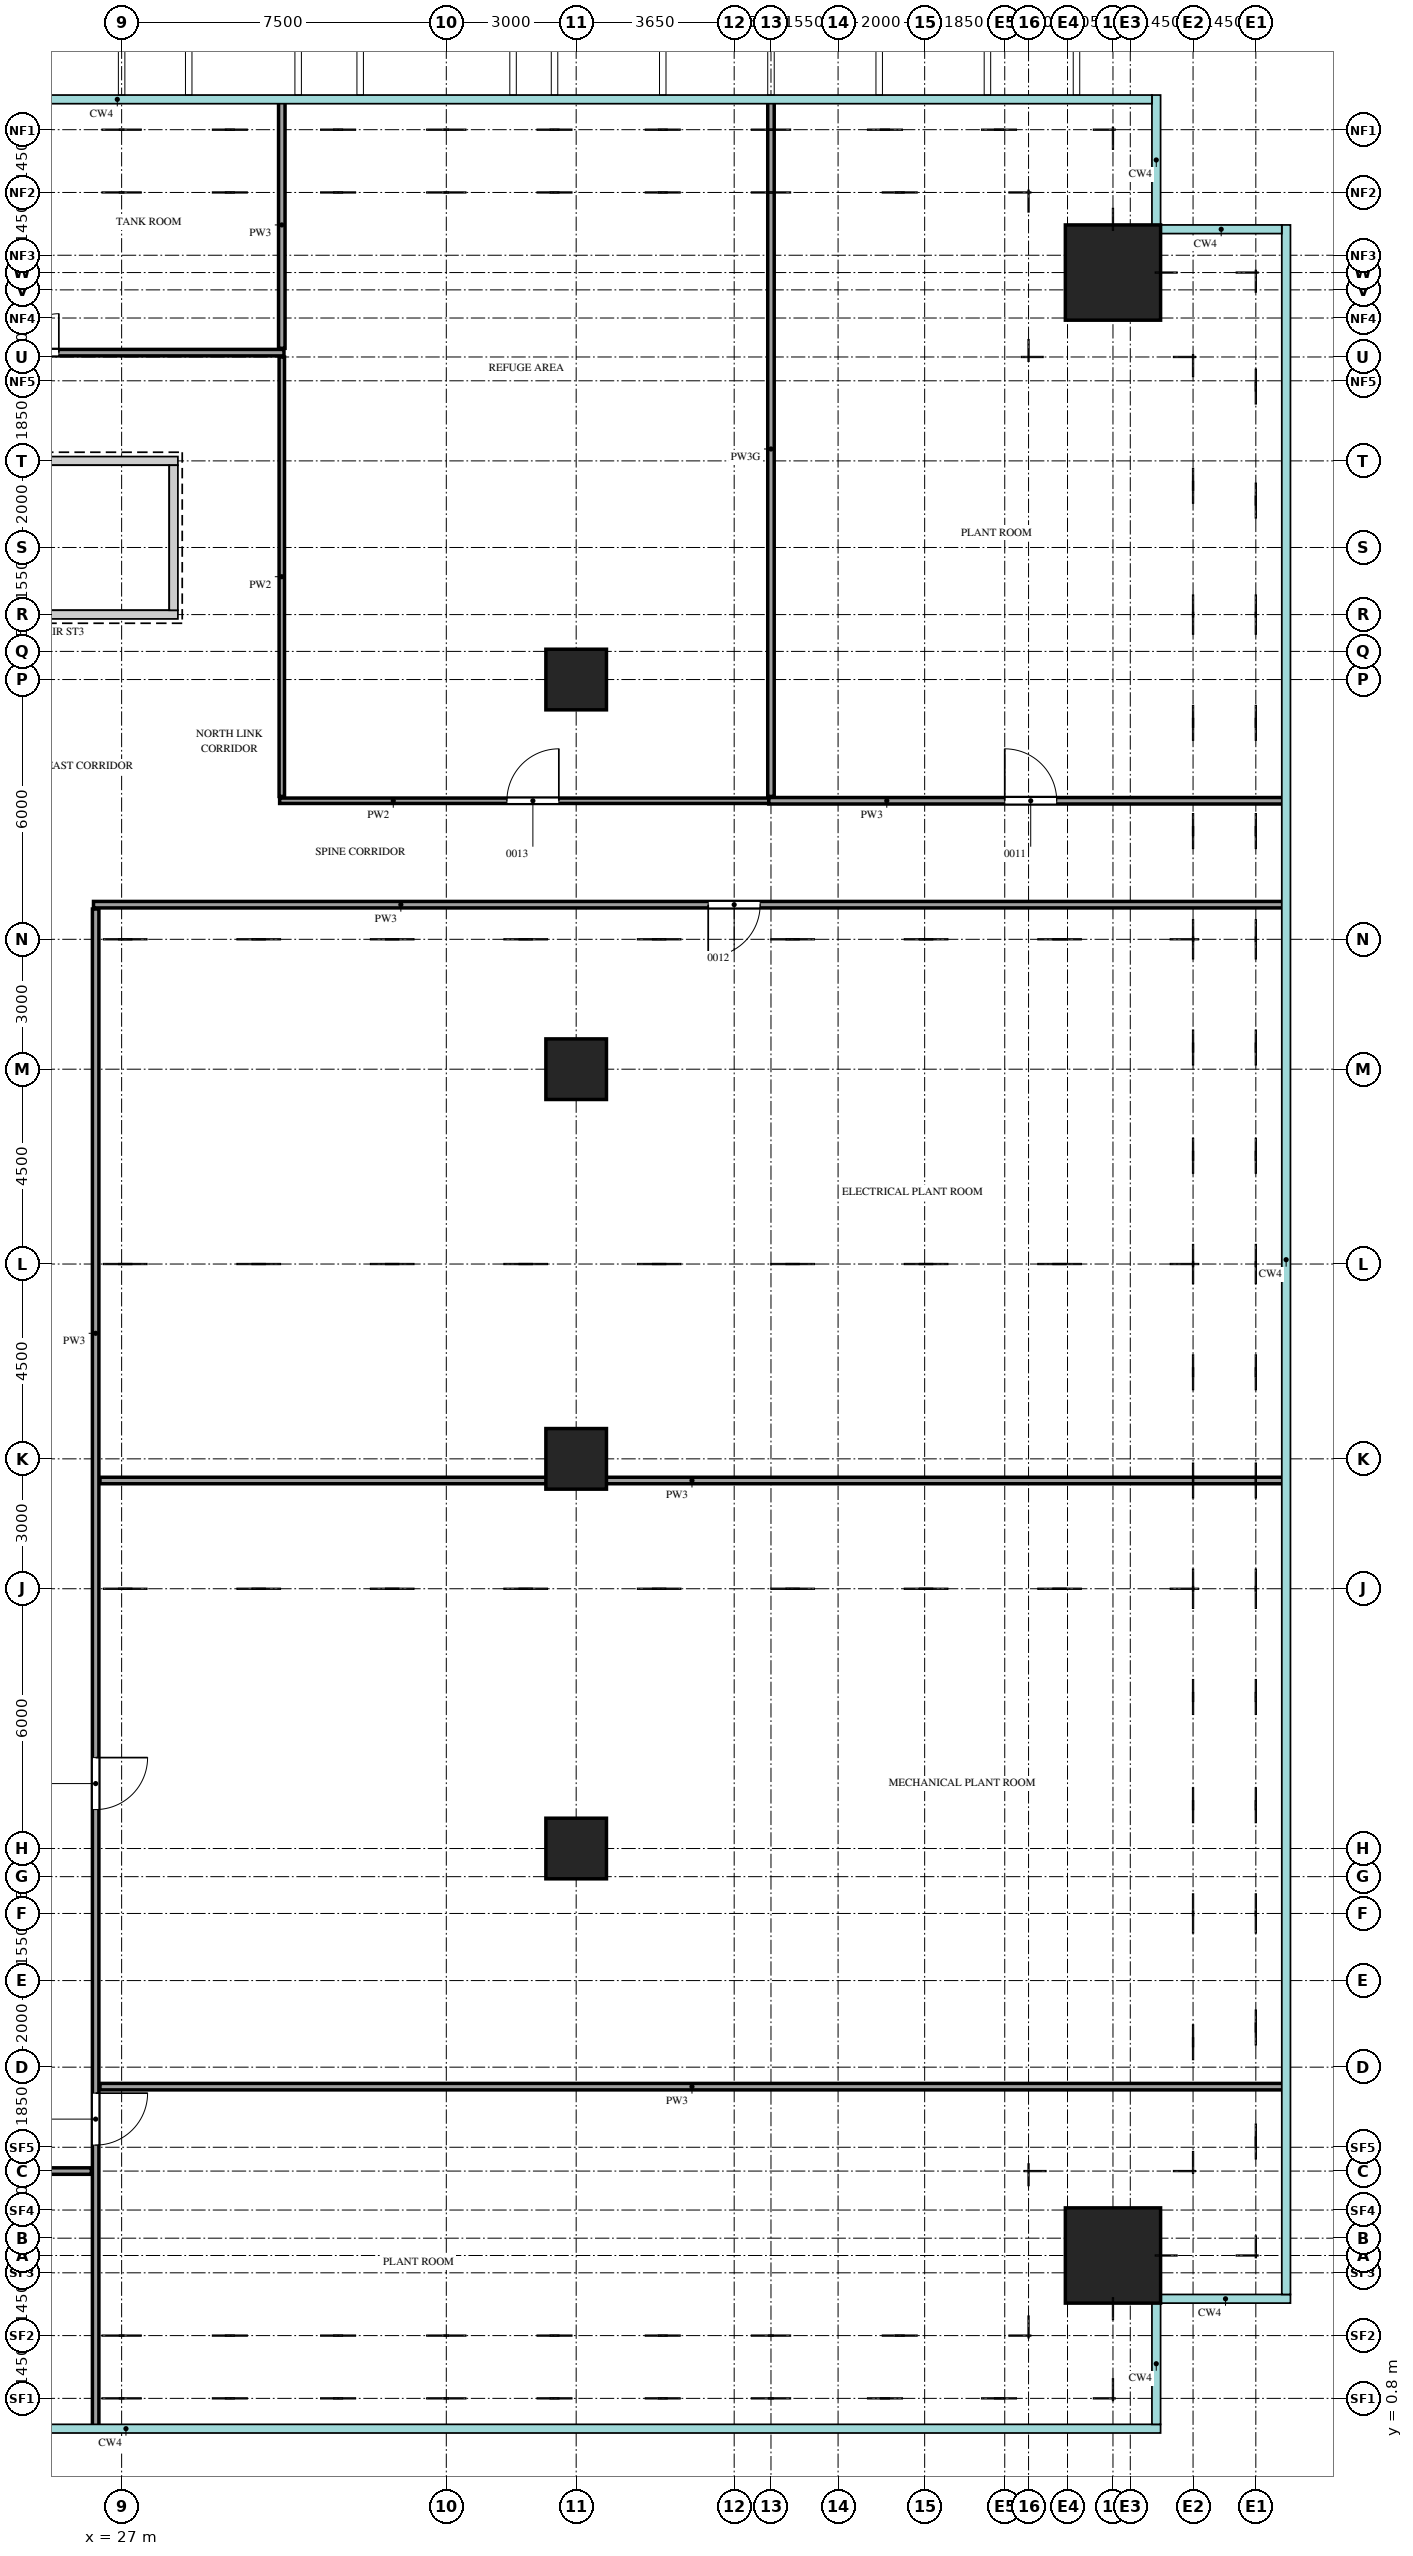
"""IFC4 building model, lengths in metres.
Left out: names, types, materials, properties, quantities, classifications, styles, units other than length and angle.
Written with IfcOpenShell. Run it as: python <this file> out.ifc"""

import sys

from ifc_helpers import new_model, si_unit, direction, frame, frame_2d, origin, origin_2d, place, context, subcontext, project, spatial, rectangle, extrude, source, transform, mapped, element, fill, save


model = new_model("IFC4")
c1 = context("Model", 3, precision=1e-05, world=origin(), true_north=direction((0.0, 1.0)))
c2 = subcontext(c1, "Body", "Model", "MODEL_VIEW")
j1 = project(units=[si_unit("LENGTHUNIT", "METRE"), si_unit("PLANEANGLEUNIT", "RADIAN")], contexts=[c1])
p1 = place(None, origin())
s1 = spatial("IfcSite", under=j1, at=p1, CompositionType="ELEMENT")
p2 = place(p1, origin())
s2 = spatial("IfcBuilding", under=s1, at=p2, CompositionType="ELEMENT")
p3 = place(p2, frame((0.0, 0.0, 96.0)))
s3 = spatial("IfcBuildingStorey", under=s2, at=p3, CompositionType="ELEMENT", Elevation=96.0)
m1 = source(origin(), c2, "Body", "SweptSolid", [
    extrude(rectangle(XDim=7.1, YDim=0.2, at=frame_2d((3.55, 0.0))), origin(), (0.0, 0.0, 1.0), 5.2),
])
p4 = place(p3, frame((21.2, 45.55, 0.0), z_axis=(0.0, 0.0, 1.0), x_axis=(1.0, 0.0, 0.0)))
e1 = element("IfcWall", 1, at=p4, inside=s3, PredefinedType="SHEAR", context=c2, shape_type="MappedRepresentation", body=[
    mapped(m1, transform((0.0, 0.0, 0.0))),
])
m2 = source(origin(), c2, "Body", "SweptSolid", [
    extrude(rectangle(XDim=1.2, YDim=2.1, at=frame_2d((0.6, 1.05))), frame((0.0, 0.11, 0.0), z_axis=(0.0, -1.0, 0.0), x_axis=(1.0, 0.0, 0.0)), (0.0, 0.0, 1.0), 0.22),
])
p5 = place(p4, frame((0.15, 0.0, 0.0)))
e2 = element("IfcOpeningElement", 2, at=p5, cuts=e1, PredefinedType="OPENING", context=c2, shape_type="MappedRepresentation", body=[
    mapped(m2, transform((0.0, 0.0, 0.0))),
])
p6 = place(p3, frame((21.2, 42.0, 0.0), z_axis=(0.0, 0.0, 1.0), x_axis=(1.0, 0.0, 0.0)))
e3 = element("IfcWall", 3, at=p6, inside=s3, PredefinedType="SHEAR", context=c2, shape_type="MappedRepresentation", body=[
    mapped(m1, transform((0.0, 0.0, 0.0))),
])
m3 = source(origin(), c2, "Body", "SweptSolid", [
    extrude(rectangle(XDim=3.35, YDim=0.2, at=frame_2d((1.675, 0.0))), origin(), (0.0, 0.0, 1.0), 5.2),
])
p7 = place(p3, frame((28.2, 42.1, 0.0), z_axis=(0.0, 0.0, 1.0), x_axis=(0.0, 1.0, 0.0)))
e4 = element("IfcWall", 4, at=p7, inside=s3, PredefinedType="SHEAR", context=c2, shape_type="MappedRepresentation", body=[
    mapped(m3, transform((0.0, 0.0, 0.0))),
])
m4 = source(origin(), c2, "Body", "SweptSolid", [
    extrude(rectangle(XDim=2.2, YDim=2.2, at=origin_2d()), origin(), (0.0, 0.0, 1.0), 5.5),
])
for number, where, z_axis, x_axis in (
    (5, (49.9, 49.9, 0.0), (0.0, 0.0, 1.0), (1.0, 0.0, 0.0)),
    (6, (49.9, 4.1, 0.0), (0.0, 0.0, 1.0), (1.0, 0.0, 0.0)),
):
    element("IfcColumn", number, at=place(p3, frame(where, z_axis=z_axis, x_axis=x_axis)), inside=s3, PredefinedType="COLUMN", context=c2, shape_type="MappedRepresentation", body=[
        mapped(m4, transform((0.0, 0.0, 0.0))),
    ])
m5 = source(origin(), c2, "Body", "SweptSolid", [
    extrude(rectangle(XDim=1.4, YDim=1.4, at=origin_2d()), origin(), (0.0, 0.0, 1.0), 5.2),
])
for number, where, z_axis, x_axis in (
    (7, (37.5, 13.5, 0.0), (0.0, 0.0, 1.0), (1.0, 0.0, 0.0)),
    (8, (37.5, 22.5, 0.0), (0.0, 0.0, 1.0), (1.0, 0.0, 0.0)),
    (9, (37.5, 31.5, 0.0), (0.0, 0.0, 1.0), (1.0, 0.0, 0.0)),
    (10, (37.5, 40.5, 0.0), (0.0, 0.0, 1.0), (1.0, 0.0, 0.0)),
):
    element("IfcColumn", number, at=place(p3, frame(where, z_axis=z_axis, x_axis=x_axis)), inside=s3, PredefinedType="COLUMN", context=c2, shape_type="MappedRepresentation", body=[
        mapped(m5, transform((0.0, 0.0, 0.0))),
    ])
m6 = source(origin(), c2, "Body", "SweptSolid", [
    extrude(rectangle(XDim=35.05, YDim=0.15, at=frame_2d((17.525, 0.0))), origin(), (0.0, 0.0, 1.0), 5.2),
])
p8 = place(p3, frame((26.4, 0.15, 0.0), z_axis=(0.0, 0.0, 1.0), x_axis=(0.0, 1.0, 0.0)))
e11 = element("IfcWall", 11, at=p8, inside=s3, PredefinedType="PARTITIONING", context=c2, shape_type="MappedRepresentation", body=[
    mapped(m6, transform((0.0, 0.0, 0.0))),
])
m7 = source(origin(), c2, "Body", "SweptSolid", [
    extrude(rectangle(XDim=1.2, YDim=2.1, at=frame_2d((0.6, 1.05))), frame((0.0, 0.085, 0.0), z_axis=(0.0, -1.0, 0.0), x_axis=(1.0, 0.0, 0.0)), (0.0, 0.0, 1.0), 0.17),
])
p9 = place(p8, frame((6.5, 0.0, 0.0)))
e12 = element("IfcOpeningElement", 12, at=p9, cuts=e11, PredefinedType="OPENING", context=c2, shape_type="MappedRepresentation", body=[
    mapped(m7, transform((0.0, 0.0, 0.0))),
])
p10 = place(p8, frame((14.25, 0.0, 0.0)))
e13 = element("IfcOpeningElement", 13, at=p10, cuts=e11, PredefinedType="OPENING", context=c2, shape_type="MappedRepresentation", body=[
    mapped(m7, transform((0.0, 0.0, 0.0))),
])
m8 = source(origin(), c2, "Body", "SweptSolid", [
    extrude(rectangle(XDim=22.0, YDim=0.15, at=frame_2d((11.0, 0.0))), origin(), (0.0, 0.0, 1.0), 5.2),
])
p11 = place(p3, frame((4.3, 6.05, 0.0), z_axis=(0.0, 0.0, 1.0), x_axis=(1.0, 0.0, 0.0)))
e14 = element("IfcWall", 14, at=p11, inside=s3, PredefinedType="PARTITIONING", context=c2, shape_type="MappedRepresentation", body=[
    mapped(m8, transform((0.0, 0.0, 0.0))),
])
p12 = place(p11, frame((9.05, 0.0, 0.0)))
e15 = element("IfcOpeningElement", 15, at=p12, cuts=e14, PredefinedType="OPENING", context=c2, shape_type="MappedRepresentation", body=[
    mapped(m7, transform((0.0, 0.0, 0.0))),
])
m9 = source(origin(), c2, "Body", "SweptSolid", [
    extrude(rectangle(XDim=27.35, YDim=0.15, at=frame_2d((13.675, 0.0))), origin(), (0.0, 0.0, 1.0), 5.2),
])
for number, where, z_axis, x_axis in (
    (16, (26.5, 8.0, 0.0), (0.0, 0.0, 1.0), (1.0, 0.0, 0.0)),
    (17, (26.5, 22.0, 0.0), (0.0, 0.0, 1.0), (1.0, 0.0, 0.0)),
):
    element("IfcWall", number, at=place(p3, frame(where, z_axis=z_axis, x_axis=x_axis)), inside=s3, PredefinedType="PARTITIONING", context=c2, shape_type="MappedRepresentation", body=[
        mapped(m9, transform((0.0, 0.0, 0.0))),
    ])
m10 = source(origin(), c2, "Body", "SweptSolid", [
    extrude(rectangle(XDim=27.5, YDim=0.15, at=frame_2d((13.75, 0.0))), origin(), (0.0, 0.0, 1.0), 5.2),
])
p13 = place(p3, frame((26.35, 35.3, 0.0), z_axis=(0.0, 0.0, 1.0), x_axis=(1.0, 0.0, 0.0)))
e18 = element("IfcWall", 18, at=p13, inside=s3, PredefinedType="PARTITIONING", context=c2, shape_type="MappedRepresentation", body=[
    mapped(m10, transform((0.0, 0.0, 0.0))),
])
p14 = place(p13, frame((14.2, 0.0, 0.0)))
e19 = element("IfcOpeningElement", 19, at=p14, cuts=e18, PredefinedType="OPENING", context=c2, shape_type="MappedRepresentation", body=[
    mapped(m7, transform((0.0, 0.0, 0.0))),
])
m11 = source(origin(), c2, "Body", "SweptSolid", [
    extrude(rectangle(XDim=11.3, YDim=0.125, at=frame_2d((5.65, 0.0))), origin(), (0.0, 0.0, 1.0), 5.2),
])
p15 = place(p3, frame((30.65, 37.7, 0.0), z_axis=(0.0, 0.0, 1.0), x_axis=(1.0, 0.0, 0.0)))
e20 = element("IfcWall", 20, at=p15, inside=s3, PredefinedType="PARTITIONING", context=c2, shape_type="MappedRepresentation", body=[
    mapped(m11, transform((0.0, 0.0, 0.0))),
])
m12 = source(origin(), c2, "Body", "SweptSolid", [
    extrude(rectangle(XDim=1.2, YDim=2.1, at=frame_2d((0.6, 1.05))), frame((0.0, 0.073, 0.0), z_axis=(0.0, -1.0, 0.0), x_axis=(1.0, 0.0, 0.0)), (0.0, 0.0, 1.0), 0.145),
])
p16 = place(p15, frame((5.25, 0.0, 0.0)))
e21 = element("IfcOpeningElement", 21, at=p16, cuts=e20, PredefinedType="OPENING", context=c2, shape_type="MappedRepresentation", body=[
    mapped(m12, transform((0.0, 0.0, 0.0))),
])
m13 = source(origin(), c2, "Body", "SweptSolid", [
    extrude(rectangle(XDim=11.9, YDim=0.15, at=frame_2d((5.95, 0.0))), origin(), (0.0, 0.0, 1.0), 5.2),
])
p17 = place(p3, frame((41.95, 37.7, 0.0), z_axis=(0.0, 0.0, 1.0), x_axis=(1.0, 0.0, 0.0)))
e22 = element("IfcWall", 22, at=p17, inside=s3, PredefinedType="PARTITIONING", context=c2, shape_type="MappedRepresentation", body=[
    mapped(m13, transform((0.0, 0.0, 0.0))),
])
p18 = place(p17, frame((5.45, 0.0, 0.0)))
e23 = element("IfcOpeningElement", 23, at=p18, cuts=e22, PredefinedType="OPENING", context=c2, shape_type="MappedRepresentation", body=[
    mapped(m7, transform((0.0, 0.0, 0.0))),
])
m14 = source(origin(), c2, "Body", "SweptSolid", [
    extrude(rectangle(XDim=10.15, YDim=0.125, at=frame_2d((5.075, 0.0))), origin(), (0.0, 0.0, 1.0), 5.2),
])
p19 = place(p3, frame((30.7, 37.8, 0.0), z_axis=(0.0, 0.0, 1.0), x_axis=(0.0, 1.0, 0.0)))
e24 = element("IfcWall", 24, at=p19, inside=s3, PredefinedType="PARTITIONING", context=c2, shape_type="MappedRepresentation", body=[
    mapped(m14, transform((0.0, 0.0, 0.0))),
])
m15 = source(origin(), c2, "Body", "SweptSolid", [
    extrude(rectangle(XDim=16.05, YDim=0.15, at=frame_2d((8.025, 0.0))), origin(), (0.0, 0.0, 1.0), 2.35),
])
p20 = place(p3, frame((42.0, 37.8, 0.0), z_axis=(0.0, 0.0, 1.0), x_axis=(0.0, 1.0, 0.0)))
e25 = element("IfcWall", 25, at=p20, inside=s3, PredefinedType="PARTITIONING", context=c2, shape_type="MappedRepresentation", body=[
    mapped(m15, transform((0.0, 0.0, 0.0))),
])
m16 = source(origin(), c2, "Body", "SweptSolid", [
    extrude(rectangle(XDim=26.45, YDim=0.15, at=frame_2d((13.225, 0.0))), origin(), (0.0, 0.0, 1.0), 5.2),
])
p21 = place(p3, frame((4.3, 48.05, 0.0), z_axis=(0.0, 0.0, 1.0), x_axis=(1.0, 0.0, 0.0)))
e26 = element("IfcWall", 26, at=p21, inside=s3, PredefinedType="PARTITIONING", context=c2, shape_type="MappedRepresentation", body=[
    mapped(m16, transform((0.0, 0.0, 0.0))),
])
m17 = source(origin(), c2, "Body", "SweptSolid", [
    extrude(rectangle(XDim=0.9, YDim=2.1, at=frame_2d((0.45, 1.05))), frame((0.0, 0.085, 0.0), z_axis=(0.0, -1.0, 0.0), x_axis=(1.0, 0.0, 0.0)), (0.0, 0.0, 1.0), 0.17),
])
p22 = place(p21, frame((3.35, 0.0, 0.0)))
e27 = element("IfcOpeningElement", 27, at=p22, cuts=e26, PredefinedType="OPENING", context=c2, shape_type="MappedRepresentation", body=[
    mapped(m17, transform((0.0, 0.0, 0.0))),
])
p23 = place(p21, frame((10.85, 0.0, 0.0)))
e28 = element("IfcOpeningElement", 28, at=p23, cuts=e26, PredefinedType="OPENING", context=c2, shape_type="MappedRepresentation", body=[
    mapped(m17, transform((0.0, 0.0, 0.0))),
])
p24 = place(p21, frame((20.35, 0.0, 0.0)))
e29 = element("IfcOpeningElement", 29, at=p24, cuts=e26, PredefinedType="OPENING", context=c2, shape_type="MappedRepresentation", body=[
    mapped(m17, transform((0.0, 0.0, 0.0))),
])
m18 = source(origin(), c2, "Body", "SweptSolid", [
    extrude(rectangle(XDim=5.7, YDim=0.15, at=frame_2d((2.85, 0.0))), origin(), (0.0, 0.0, 1.0), 5.2),
])
p25 = place(p3, frame((30.7, 48.15, 0.0), z_axis=(0.0, 0.0, 1.0), x_axis=(0.0, 1.0, 0.0)))
e30 = element("IfcWall", 30, at=p25, inside=s3, PredefinedType="PARTITIONING", context=c2, shape_type="MappedRepresentation", body=[
    mapped(m18, transform((0.0, 0.0, 0.0))),
])
m19 = source(origin(), c2, "Body", "SweptSolid", [
    extrude(rectangle(XDim=1.2, YDim=2.1, at=frame_2d((0.6, 1.05))), frame((0.0, 0.025, 0.0), z_axis=(0.0, -1.0, 0.0), x_axis=(1.0, 0.0, 0.0)), (0.0, 0.0, 1.0), 0.05),
])
p26 = place(p9, origin())
e31 = element("IfcDoor", 31, at=p26, inside=s3, OperationType="SINGLE_SWING_RIGHT", PredefinedType="DOOR", context=c2, shape_type="MappedRepresentation", body=[
    mapped(m19, transform((0.0, 0.0, 0.0))),
])
fill(e12, e31)
p27 = place(p10, origin())
e32 = element("IfcDoor", 32, at=p27, inside=s3, OperationType="SINGLE_SWING_RIGHT", PredefinedType="DOOR", context=c2, shape_type="MappedRepresentation", body=[
    mapped(m19, transform((0.0, 0.0, 0.0))),
])
fill(e13, e32)
p28 = place(p14, origin())
e33 = element("IfcDoor", 33, at=p28, inside=s3, OperationType="SINGLE_SWING_LEFT", PredefinedType="DOOR", context=c2, shape_type="MappedRepresentation", body=[
    mapped(m19, transform((0.0, 0.0, 0.0))),
])
fill(e19, e33)
p29 = place(p16, origin())
e34 = element("IfcDoor", 34, at=p29, inside=s3, OperationType="SINGLE_SWING_LEFT", PredefinedType="DOOR", context=c2, shape_type="MappedRepresentation", body=[
    mapped(m19, transform((0.0, 0.0, 0.0))),
])
fill(e21, e34)
p30 = place(p18, origin())
e35 = element("IfcDoor", 35, at=p30, inside=s3, OperationType="SINGLE_SWING_RIGHT", PredefinedType="DOOR", context=c2, shape_type="MappedRepresentation", body=[
    mapped(m19, transform((0.0, 0.0, 0.0))),
])
fill(e23, e35)
m20 = source(origin(), c2, "Body", "SweptSolid", [
    extrude(rectangle(XDim=0.9, YDim=2.1, at=frame_2d((0.45, 1.05))), frame((0.0, 0.025, 0.0), z_axis=(0.0, -1.0, 0.0), x_axis=(1.0, 0.0, 0.0)), (0.0, 0.0, 1.0), 0.05),
])
p31 = place(p24, origin())
e36 = element("IfcDoor", 36, at=p31, inside=s3, OperationType="SINGLE_SWING_LEFT", PredefinedType="DOOR", context=c2, shape_type="MappedRepresentation", body=[
    mapped(m20, transform((0.0, 0.0, 0.0))),
])
fill(e29, e36)
save(model, sys.argv[1])
